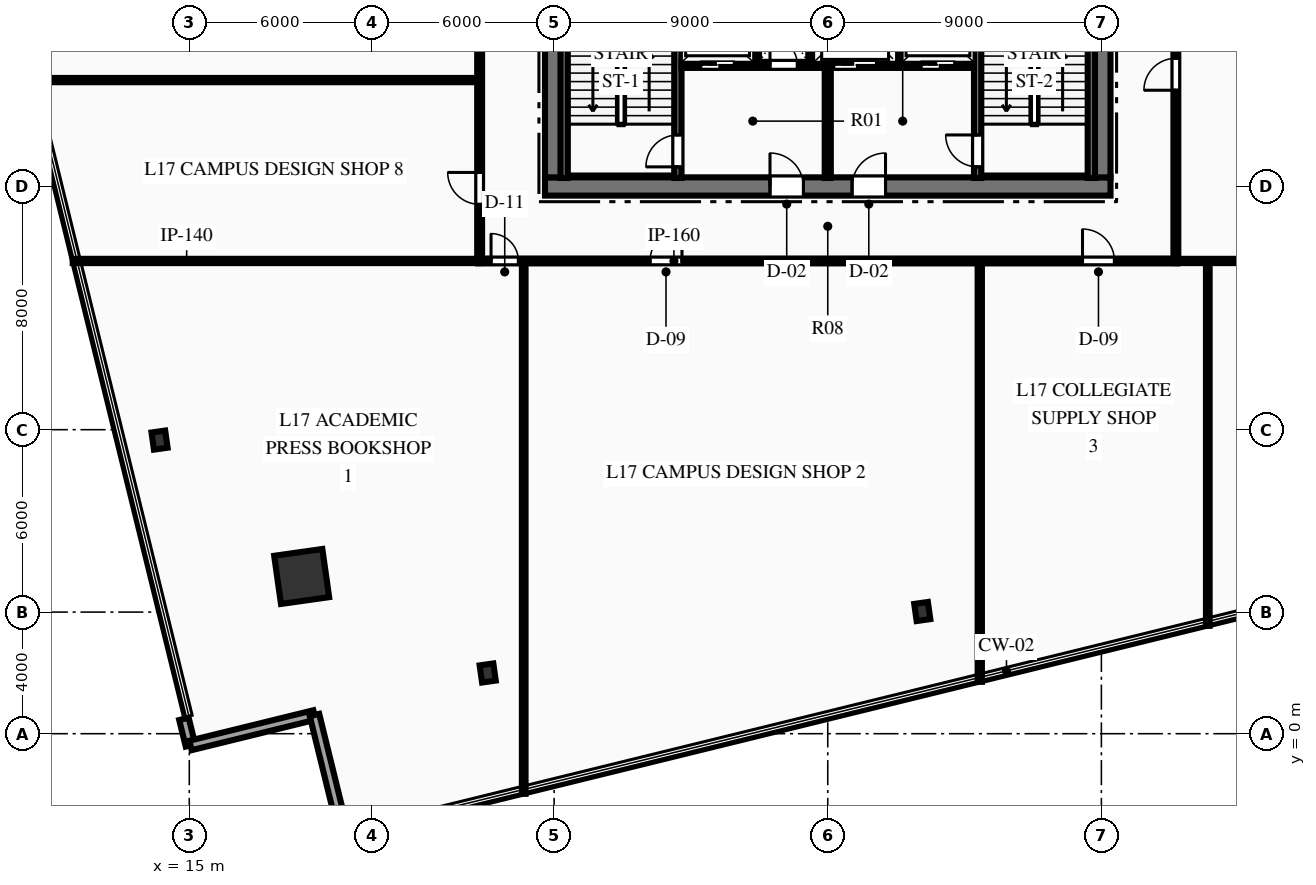
"""IFC4 building model, lengths in metres.
Left out: names, types, materials, properties, quantities, classifications, styles, units other than length and angle.
Written with IfcOpenShell. Run it as: python <this file> out.ifc"""

import sys

from ifc_helpers import new_model, si_unit, direction, frame, frame_2d, origin, origin_2d, place, context, subcontext, project, spatial, rectangle, hollow_rectangle, i_section, extrude, element, fill, save


model = new_model("IFC4")
c1 = context("Model", 3, precision=1e-05, world=origin(), true_north=direction((0.0, 1.0)))
c2 = subcontext(c1, "Body", "Model", "MODEL_VIEW")
j1 = project(units=[si_unit("LENGTHUNIT", "METRE"), si_unit("PLANEANGLEUNIT", "RADIAN")], contexts=[c1])
p1 = place(None, origin())
s1 = spatial("IfcSite", under=j1, at=p1, CompositionType="ELEMENT")
p2 = place(p1, origin())
s2 = spatial("IfcBuilding", under=s1, at=p2, CompositionType="ELEMENT")
p3 = place(p2, frame((0.0, 0.0, 73.95)))
s3 = spatial("IfcBuildingStorey", under=s2, at=p3, CompositionType="ELEMENT", Elevation=73.95)
p4 = place(p3, frame((26.7, 18.0, 0.0), z_axis=(0.0, 0.0, 1.0), x_axis=(1.0, 0.0, 0.0)))
e1 = element("IfcWall", 1, at=p4, inside=s3, PredefinedType="SHEAR", context=c2, shape_type="SweptSolid", body=[
    extrude(rectangle(XDim=18.6, YDim=0.6, at=frame_2d((9.3, 0.0))), origin(), (0.0, 0.0, 1.0), 3.75),
])
p5 = place(p4, frame((7.4, 0.0, 0.0)))
e2 = element("IfcOpeningElement", 2, at=p5, cuts=e1, PredefinedType="OPENING", context=c2, shape_type="SweptSolid", body=[
    extrude(rectangle(XDim=1.1, YDim=2.15, at=frame_2d((0.55, 1.075))), frame((0.0, 0.31, 0.0), z_axis=(0.0, -1.0, 0.0), x_axis=(1.0, 0.0, 0.0)), (0.0, 0.0, 1.0), 0.62),
])
p6 = place(p4, frame((10.1, 0.0, 0.0)))
e3 = element("IfcOpeningElement", 3, at=p6, cuts=e1, PredefinedType="OPENING", context=c2, shape_type="SweptSolid", body=[
    extrude(rectangle(XDim=1.1, YDim=2.15, at=frame_2d((0.55, 1.075))), frame((0.0, 0.31, 0.0), z_axis=(0.0, -1.0, 0.0), x_axis=(1.0, 0.0, 0.0)), (0.0, 0.0, 1.0), 0.62),
])
p7 = place(p3, frame((27.0, 18.3, 0.0), z_axis=(0.0, 0.0, 1.0), x_axis=(0.0, 1.0, 0.0)))
e4 = element("IfcWall", 4, at=p7, inside=s3, PredefinedType="SHEAR", context=c2, shape_type="SweptSolid", body=[
    extrude(rectangle(XDim=15.4, YDim=0.6, at=frame_2d((7.7, 0.0))), origin(), (0.0, 0.0, 1.0), 3.75),
])
p8 = place(p7, frame((9.94, 0.0, 0.0)))
e5 = element("IfcOpeningElement", 5, at=p8, cuts=e4, PredefinedType="OPENING", context=c2, shape_type="SweptSolid", body=[
    extrude(rectangle(XDim=1.4, YDim=2.2, at=frame_2d((0.7, 1.1))), frame((0.0, 0.31, 0.0), z_axis=(0.0, -1.0, 0.0), x_axis=(1.0, 0.0, 0.0)), (0.0, 0.0, 1.0), 0.62),
])
p9 = place(p3, frame((45.0, 18.3, 0.0), z_axis=(0.0, 0.0, 1.0), x_axis=(0.0, 1.0, 0.0)))
e6 = element("IfcWall", 6, at=p9, inside=s3, PredefinedType="SHEAR", context=c2, shape_type="SweptSolid", body=[
    extrude(rectangle(XDim=15.4, YDim=0.6, at=frame_2d((7.7, 0.0))), origin(), (0.0, 0.0, 1.0), 3.75),
])
p10 = place(p9, frame((9.94, 0.0, 0.0)))
e7 = element("IfcOpeningElement", 7, at=p10, cuts=e6, PredefinedType="OPENING", context=c2, shape_type="SweptSolid", body=[
    extrude(rectangle(XDim=1.4, YDim=2.2, at=frame_2d((0.7, 1.1))), frame((0.0, 0.31, 0.0), z_axis=(0.0, -1.0, 0.0), x_axis=(1.0, 0.0, 0.0)), (0.0, 0.0, 1.0), 0.62),
])
p11 = place(p3, frame((31.07, 18.28, 0.0), z_axis=(0.0, 0.0, 1.0), x_axis=(0.0, 1.0, 0.0)))
e8 = element("IfcWall", 8, at=p11, inside=s3, PredefinedType="SHEAR", context=c2, shape_type="SweptSolid", body=[
    extrude(rectangle(XDim=8.26, YDim=0.24, at=frame_2d((4.13, 0.0))), origin(), (0.0, 0.0, 1.0), 3.75),
])
p12 = place(p11, frame((0.365, 0.0, 0.0)))
e9 = element("IfcOpeningElement", 9, at=p12, cuts=e8, PredefinedType="OPENING", context=c2, shape_type="SweptSolid", body=[
    extrude(rectangle(XDim=1.05, YDim=2.15, at=frame_2d((0.525, 1.075))), frame((0.0, 0.13, 0.0), z_axis=(0.0, -1.0, 0.0), x_axis=(1.0, 0.0, 0.0)), (0.0, 0.0, 1.0), 0.26),
])
p13 = place(p3, frame((27.33, 18.28, 0.0), z_axis=(0.0, 0.0, 1.0), x_axis=(0.0, 1.0, 0.0)))
e10 = element("IfcWall", 10, at=p13, inside=s3, PredefinedType="SHEAR", context=c2, shape_type="SweptSolid", body=[
    extrude(rectangle(XDim=8.26, YDim=0.24, at=frame_2d((4.13, 0.0))), origin(), (0.0, 0.0, 1.0), 3.75),
])
p14 = place(p3, frame((40.93, 18.28, 0.0), z_axis=(0.0, 0.0, 1.0), x_axis=(0.0, 1.0, 0.0)))
e11 = element("IfcWall", 11, at=p14, inside=s3, PredefinedType="SHEAR", context=c2, shape_type="SweptSolid", body=[
    extrude(rectangle(XDim=8.26, YDim=0.24, at=frame_2d((4.13, 0.0))), origin(), (0.0, 0.0, 1.0), 3.75),
])
p15 = place(p14, frame((0.365, 0.0, 0.0)))
e12 = element("IfcOpeningElement", 12, at=p15, cuts=e11, PredefinedType="OPENING", context=c2, shape_type="SweptSolid", body=[
    extrude(rectangle(XDim=1.05, YDim=2.15, at=frame_2d((0.525, 1.075))), frame((0.0, 0.13, 0.0), z_axis=(0.0, -1.0, 0.0), x_axis=(1.0, 0.0, 0.0)), (0.0, 0.0, 1.0), 0.26),
])
p16 = place(p3, frame((44.67, 18.28, 0.0), z_axis=(0.0, 0.0, 1.0), x_axis=(0.0, 1.0, 0.0)))
e13 = element("IfcWall", 13, at=p16, inside=s3, PredefinedType="SHEAR", context=c2, shape_type="SweptSolid", body=[
    extrude(rectangle(XDim=8.26, YDim=0.24, at=frame_2d((4.13, 0.0))), origin(), (0.0, 0.0, 1.0), 3.75),
])
p17 = place(p3, frame((18.696, 5.172, 0.0), z_axis=(0.0, 0.0, 1.0), x_axis=(0.990146240249, 0.140037219771, 0.0)))
e14 = element("IfcColumn", 14, at=p17, inside=s3, PredefinedType="COLUMN", context=c2, shape_type="SweptSolid", body=[
    extrude(hollow_rectangle(XDim=1.6, YDim=1.6, WallThickness=0.08, at=origin_2d()), origin(), (0.0, 0.0, 1.0), 3.75),
])
for number, where, z_axis, x_axis in (
    (15, (24.815, 1.997, 0.0), (0.0, 0.0, 1.0), (0.99, 0.14, 0.0)),
    (16, (39.109, 4.019, 0.0), (0.0, 0.0, 1.0), (0.99, 0.14, 0.0)),
    (17, (14.022, 9.657, 0.0), (0.0, 0.0, 1.0), (0.99, 0.14, 0.0)),
):
    element("IfcColumn", number, at=place(p3, frame(where, z_axis=z_axis, x_axis=x_axis)), inside=s3, PredefinedType="COLUMN", context=c2, shape_type="SweptSolid", body=[
        extrude(i_section(OverallWidth=0.454, OverallDepth=0.569, WebThickness=0.078, FlangeThickness=0.125, at=origin_2d()), origin(), (0.0, 0.0, 1.0), 3.75),
    ])
p18 = place(p3, frame((15.039, -0.387, 0.0), z_axis=(0.0, 0.0, 1.0), x_axis=(-0.238704255463, 0.971092311999, 0.0)))
e18 = element("IfcWall", 18, at=p18, inside=s3, PredefinedType="STANDARD", context=c2, shape_type="SweptSolid", body=[
    extrude(rectangle(XDim=0.9, YDim=0.32, at=frame_2d((0.45, 0.0))), origin(), (0.0, 0.0, 1.0), 3.44),
])
p19 = place(p3, frame((19.118, 0.615, 0.0), z_axis=(0.0, 0.0, 1.0), x_axis=(-0.971129335226, -0.238553587824, 0.0)))
e19 = element("IfcWall", 19, at=p19, inside=s3, PredefinedType="STANDARD", context=c2, shape_type="SweptSolid", body=[
    extrude(rectangle(XDim=4.2, YDim=0.32, at=frame_2d((2.1, 0.0))), origin(), (0.0, 0.0, 1.0), 3.44),
])
p20 = place(p3, frame((20.12, -3.463, 0.0), z_axis=(0.0, 0.0, 1.0), x_axis=(-0.238512231586, 0.971139493267, 0.0)))
e20 = element("IfcWall", 20, at=p20, inside=s3, PredefinedType="STANDARD", context=c2, shape_type="SweptSolid", body=[
    extrude(rectangle(XDim=4.2, YDim=0.32, at=frame_2d((2.1, 0.0))), origin(), (0.0, 0.0, 1.0), 3.44),
])
p21 = place(p3, frame((36.0, 18.28, 0.0), z_axis=(0.0, 0.0, 1.0), x_axis=(0.0, 1.0, 0.0)))
e21 = element("IfcWall", 21, at=p21, inside=s3, PredefinedType="PARTITIONING", context=c2, shape_type="SweptSolid", body=[
    extrude(rectangle(XDim=3.77, YDim=0.2, at=frame_2d((1.885, 0.0))), origin(), (0.0, 0.0, 1.0), 3.44),
])
p22 = place(p3, frame((31.19, 22.0, 0.0), z_axis=(0.0, 0.0, 1.0), x_axis=(1.0, 0.0, 0.0)))
e22 = element("IfcWall", 22, at=p22, inside=s3, PredefinedType="PARTITIONING", context=c2, shape_type="SweptSolid", body=[
    extrude(rectangle(XDim=4.69, YDim=0.2, at=frame_2d((2.345, 0.0))), origin(), (0.0, 0.0, 1.0), 3.44),
])
p23 = place(p22, frame((2.91, 0.0, 0.0)))
e23 = element("IfcOpeningElement", 23, at=p23, cuts=e22, PredefinedType="OPENING", context=c2, shape_type="SweptSolid", body=[
    extrude(rectangle(XDim=0.9, YDim=2.15, at=frame_2d((0.45, 1.075))), frame((0.0, 0.11, 0.0), z_axis=(0.0, -1.0, 0.0), x_axis=(1.0, 0.0, 0.0)), (0.0, 0.0, 1.0), 0.22),
])
p24 = place(p22, frame((0.635, 0.0, 0.0)))
e24 = element("IfcOpeningElement", 24, at=p24, cuts=e22, PredefinedType="OPENING", context=c2, shape_type="SweptSolid", body=[
    extrude(rectangle(XDim=1.1, YDim=2.15, at=frame_2d((0.55, 1.075))), frame((0.0, 0.11, 0.0), z_axis=(0.0, -1.0, 0.0), x_axis=(1.0, 0.0, 0.0)), (0.0, 0.0, 1.0), 0.22),
])
p25 = place(p3, frame((36.12, 22.0, 0.0), z_axis=(0.0, 0.0, 1.0), x_axis=(1.0, 0.0, 0.0)))
e25 = element("IfcWall", 25, at=p25, inside=s3, PredefinedType="PARTITIONING", context=c2, shape_type="SweptSolid", body=[
    extrude(rectangle(XDim=4.69, YDim=0.2, at=frame_2d((2.345, 0.0))), origin(), (0.0, 0.0, 1.0), 3.44),
])
p26 = place(p25, frame((2.955, 0.0, 0.0)))
e26 = element("IfcOpeningElement", 26, at=p26, cuts=e25, PredefinedType="OPENING", context=c2, shape_type="SweptSolid", body=[
    extrude(rectangle(XDim=1.1, YDim=2.15, at=frame_2d((0.55, 1.075))), frame((0.0, 0.11, 0.0), z_axis=(0.0, -1.0, 0.0), x_axis=(1.0, 0.0, 0.0)), (0.0, 0.0, 1.0), 0.22),
])
p27 = place(p25, frame((0.08, 0.0, 0.0)))
e27 = element("IfcOpeningElement", 27, at=p27, cuts=e25, PredefinedType="OPENING", context=c2, shape_type="SweptSolid", body=[
    extrude(rectangle(XDim=1.4, YDim=2.2, at=frame_2d((0.7, 1.1))), frame((0.0, 0.11, 0.0), z_axis=(0.0, -1.0, 0.0), x_axis=(1.0, 0.0, 0.0)), (0.0, 0.0, 1.0), 0.22),
])
for number, where, z_axis, x_axis in (
    (28, (33.65, 22.05, 0.0), (0.0, 0.0, 1.0), (0.0, 1.0, 0.0)),
    (29, (35.45, 22.05, 0.0), (0.0, 0.0, 1.0), (0.0, 1.0, 0.0)),
    (30, (38.35, 22.05, 0.0), (0.0, 0.0, 1.0), (0.0, 1.0, 0.0)),
):
    element("IfcWall", number, at=place(p3, frame(where, z_axis=z_axis, x_axis=x_axis)), inside=s3, PredefinedType="PARTITIONING", context=c2, shape_type="SweptSolid", body=[
        extrude(rectangle(XDim=2.6, YDim=0.18, at=frame_2d((1.3, 0.0))), origin(), (0.0, 0.0, 1.0), 3.44),
    ])
p28 = place(p3, frame((24.5, 15.55, 0.0), z_axis=(0.0, 0.0, 1.0), x_axis=(1.0, 0.0, 0.0)))
e31 = element("IfcWall", 31, at=p28, inside=s3, PredefinedType="PARTITIONING", context=c2, shape_type="SweptSolid", body=[
    extrude(rectangle(XDim=23.0, YDim=0.16, at=frame_2d((11.5, 0.0))), origin(), (0.0, 0.0, 1.0), 3.44),
])
p29 = place(p28, frame((0.425, 0.0, 0.0)))
e32 = element("IfcOpeningElement", 32, at=p29, cuts=e31, PredefinedType="OPENING", context=c2, shape_type="SweptSolid", body=[
    extrude(rectangle(XDim=0.9, YDim=2.15, at=frame_2d((0.45, 1.075))), frame((0.0, 0.09, 0.0), z_axis=(0.0, -1.0, 0.0), x_axis=(1.0, 0.0, 0.0)), (0.0, 0.0, 1.0), 0.18),
])
p30 = place(p28, frame((5.655, 0.0, 0.0)))
e33 = element("IfcOpeningElement", 33, at=p30, cuts=e31, PredefinedType="OPENING", context=c2, shape_type="SweptSolid", body=[
    extrude(rectangle(XDim=1.05, YDim=2.15, at=frame_2d((0.525, 1.075))), frame((0.0, 0.09, 0.0), z_axis=(0.0, -1.0, 0.0), x_axis=(1.0, 0.0, 0.0)), (0.0, 0.0, 1.0), 0.18),
])
p31 = place(p28, frame((19.879, 0.0, 0.0)))
e34 = element("IfcOpeningElement", 34, at=p31, cuts=e31, PredefinedType="OPENING", context=c2, shape_type="SweptSolid", body=[
    extrude(rectangle(XDim=1.05, YDim=2.15, at=frame_2d((0.525, 1.075))), frame((0.0, 0.09, 0.0), z_axis=(0.0, -1.0, 0.0), x_axis=(1.0, 0.0, 0.0)), (0.0, 0.0, 1.0), 0.18),
])
p32 = place(p3, frame((24.55, 15.55, 0.0), z_axis=(0.0, 0.0, 1.0), x_axis=(0.0, 1.0, 0.0)))
e35 = element("IfcWall", 35, at=p32, inside=s3, PredefinedType="PARTITIONING", context=c2, shape_type="SweptSolid", body=[
    extrude(rectangle(XDim=20.9, YDim=0.16, at=frame_2d((10.45, 0.0))), origin(), (0.0, 0.0, 1.0), 3.44),
])
p33 = place(p32, frame((1.862, 0.0, 0.0)))
e36 = element("IfcOpeningElement", 36, at=p33, cuts=e35, PredefinedType="OPENING", context=c2, shape_type="SweptSolid", body=[
    extrude(rectangle(XDim=1.05, YDim=2.15, at=frame_2d((0.525, 1.075))), frame((0.0, 0.09, 0.0), z_axis=(0.0, -1.0, 0.0), x_axis=(1.0, 0.0, 0.0)), (0.0, 0.0, 1.0), 0.18),
])
p34 = place(p32, frame((10.509, 0.0, 0.0)))
e37 = element("IfcOpeningElement", 37, at=p34, cuts=e35, PredefinedType="OPENING", context=c2, shape_type="SweptSolid", body=[
    extrude(rectangle(XDim=1.05, YDim=2.15, at=frame_2d((0.525, 1.075))), frame((0.0, 0.09, 0.0), z_axis=(0.0, -1.0, 0.0), x_axis=(1.0, 0.0, 0.0)), (0.0, 0.0, 1.0), 0.18),
])
p35 = place(p32, frame((15.426, 0.0, 0.0)))
e38 = element("IfcOpeningElement", 38, at=p35, cuts=e35, PredefinedType="OPENING", context=c2, shape_type="SweptSolid", body=[
    extrude(rectangle(XDim=1.05, YDim=2.15, at=frame_2d((0.525, 1.075))), frame((0.0, 0.09, 0.0), z_axis=(0.0, -1.0, 0.0), x_axis=(1.0, 0.0, 0.0)), (0.0, 0.0, 1.0), 0.18),
])
p36 = place(p3, frame((47.45, 15.55, 0.0), z_axis=(0.0, 0.0, 1.0), x_axis=(0.0, 1.0, 0.0)))
e39 = element("IfcWall", 39, at=p36, inside=s3, PredefinedType="PARTITIONING", context=c2, shape_type="SweptSolid", body=[
    extrude(rectangle(XDim=20.9, YDim=0.16, at=frame_2d((10.45, 0.0))), origin(), (0.0, 0.0, 1.0), 3.44),
])
p37 = place(p36, frame((5.616, 0.0, 0.0)))
e40 = element("IfcOpeningElement", 40, at=p37, cuts=e39, PredefinedType="OPENING", context=c2, shape_type="SweptSolid", body=[
    extrude(rectangle(XDim=1.05, YDim=2.15, at=frame_2d((0.525, 1.075))), frame((0.0, 0.09, 0.0), z_axis=(0.0, -1.0, 0.0), x_axis=(1.0, 0.0, 0.0)), (0.0, 0.0, 1.0), 0.18),
])
p38 = place(p36, frame((17.405, 0.0, 0.0)))
e41 = element("IfcOpeningElement", 41, at=p38, cuts=e39, PredefinedType="OPENING", context=c2, shape_type="SweptSolid", body=[
    extrude(rectangle(XDim=1.05, YDim=2.15, at=frame_2d((0.525, 1.075))), frame((0.0, 0.09, 0.0), z_axis=(0.0, -1.0, 0.0), x_axis=(1.0, 0.0, 0.0)), (0.0, 0.0, 1.0), 0.18),
])
p39 = place(p3, frame((11.166, 15.55, 0.0), z_axis=(0.0, 0.0, 1.0), x_axis=(1.0, 0.0, 0.0)))
e42 = element("IfcWall", 42, at=p39, inside=s3, PredefinedType="PARTITIONING", context=c2, shape_type="SweptSolid", body=[
    extrude(rectangle(XDim=13.384, YDim=0.14, at=frame_2d((6.692, 0.0))), origin(), (0.0, 0.0, 1.0), 3.44),
])
p40 = place(p3, frame((47.45, 15.55, 0.0), z_axis=(0.0, 0.0, 1.0), x_axis=(1.0, 0.0, 0.0)))
e43 = element("IfcWall", 43, at=p40, inside=s3, PredefinedType="PARTITIONING", context=c2, shape_type="SweptSolid", body=[
    extrude(rectangle(XDim=18.518, YDim=0.14, at=frame_2d((9.259, 0.0))), origin(), (0.0, 0.0, 1.0), 3.44),
])
p41 = place(p40, frame((5.54, 0.0, 0.0)))
e44 = element("IfcOpeningElement", 44, at=p41, cuts=e43, PredefinedType="OPENING", context=c2, shape_type="SweptSolid", body=[
    extrude(rectangle(XDim=0.95, YDim=2.15, at=frame_2d((0.475, 1.075))), frame((0.0, 0.08, 0.0), z_axis=(0.0, -1.0, 0.0), x_axis=(1.0, 0.0, 0.0)), (0.0, 0.0, 1.0), 0.16),
])
p42 = place(p3, frame((26.0, -1.978, 0.0), z_axis=(0.0, 0.0, 1.0), x_axis=(0.0, 1.0, 0.0)))
e45 = element("IfcWall", 45, at=p42, inside=s3, PredefinedType="PARTITIONING", context=c2, shape_type="SweptSolid", body=[
    extrude(rectangle(XDim=17.528, YDim=0.12, at=frame_2d((8.764, 0.0))), origin(), (0.0, 0.0, 1.0), 2.972),
])
p43 = place(p3, frame((41.0, 1.706, 0.0), z_axis=(0.0, 0.0, 1.0), x_axis=(0.0, 1.0, 0.0)))
e46 = element("IfcWall", 46, at=p43, inside=s3, PredefinedType="PARTITIONING", context=c2, shape_type="SweptSolid", body=[
    extrude(rectangle(XDim=13.844, YDim=0.14, at=frame_2d((6.922, 0.0))), origin(), (0.0, 0.0, 1.0), 3.44),
])
p44 = place(p3, frame((48.5, 3.549, 0.0), z_axis=(0.0, 0.0, 1.0), x_axis=(0.0, 1.0, 0.0)))
e47 = element("IfcWall", 47, at=p44, inside=s3, PredefinedType="PARTITIONING", context=c2, shape_type="SweptSolid", body=[
    extrude(rectangle(XDim=12.001, YDim=0.12, at=frame_2d((6.001, 0.0))), origin(), (0.0, 0.0, 1.0), 3.44),
])
p45 = place(p3, frame((9.704, 21.5, 0.0), z_axis=(0.0, 0.0, 1.0), x_axis=(1.0, 0.0, 0.0)))
e48 = element("IfcWall", 48, at=p45, inside=s3, PredefinedType="PARTITIONING", context=c2, shape_type="SweptSolid", body=[
    extrude(rectangle(XDim=14.846, YDim=0.14, at=frame_2d((7.423, 0.0))), origin(), (0.0, 0.0, 1.0), 3.44),
])
p46 = place(p12, origin())
e49 = element("IfcDoor", 49, at=p46, inside=s3, OperationType="SINGLE_SWING_LEFT", PredefinedType="DOOR", context=c2, shape_type="SweptSolid", body=[
    extrude(rectangle(XDim=1.05, YDim=2.15, at=frame_2d((0.525, 1.075))), frame((0.0, 0.025, 0.0), z_axis=(0.0, -1.0, 0.0), x_axis=(1.0, 0.0, 0.0)), (0.0, 0.0, 1.0), 0.05),
])
fill(e9, e49)
p47 = place(p15, origin())
e50 = element("IfcDoor", 50, at=p47, inside=s3, OperationType="SINGLE_SWING_RIGHT", PredefinedType="DOOR", context=c2, shape_type="SweptSolid", body=[
    extrude(rectangle(XDim=1.05, YDim=2.15, at=frame_2d((0.525, 1.075))), frame((0.0, 0.025, 0.0), z_axis=(0.0, -1.0, 0.0), x_axis=(1.0, 0.0, 0.0)), (0.0, 0.0, 1.0), 0.05),
])
fill(e12, e50)
p48 = place(p5, origin())
e51 = element("IfcDoor", 51, at=p48, inside=s3, OperationType="SINGLE_SWING_LEFT", PredefinedType="DOOR", context=c2, shape_type="SweptSolid", body=[
    extrude(rectangle(XDim=1.1, YDim=2.15, at=frame_2d((0.55, 1.075))), frame((0.0, 0.025, 0.0), z_axis=(0.0, -1.0, 0.0), x_axis=(1.0, 0.0, 0.0)), (0.0, 0.0, 1.0), 0.05),
])
fill(e2, e51)
p49 = place(p6, origin())
e52 = element("IfcDoor", 52, at=p49, inside=s3, OperationType="SINGLE_SWING_RIGHT", PredefinedType="DOOR", context=c2, shape_type="SweptSolid", body=[
    extrude(rectangle(XDim=1.1, YDim=2.15, at=frame_2d((0.55, 1.075))), frame((0.0, 0.025, 0.0), z_axis=(0.0, -1.0, 0.0), x_axis=(1.0, 0.0, 0.0)), (0.0, 0.0, 1.0), 0.05),
])
fill(e3, e52)
p50 = place(p23, origin())
e53 = element("IfcDoor", 53, at=p50, inside=s3, OperationType="SINGLE_SWING_LEFT", PredefinedType="DOOR", context=c2, shape_type="SweptSolid", body=[
    extrude(rectangle(XDim=0.9, YDim=2.15, at=frame_2d((0.45, 1.075))), frame((0.0, 0.025, 0.0), z_axis=(0.0, -1.0, 0.0), x_axis=(1.0, 0.0, 0.0)), (0.0, 0.0, 1.0), 0.05),
])
fill(e23, e53)
p51 = place(p29, origin())
e54 = element("IfcDoor", 54, at=p51, inside=s3, OperationType="SINGLE_SWING_LEFT", PredefinedType="DOOR", context=c2, shape_type="SweptSolid", body=[
    extrude(rectangle(XDim=0.9, YDim=2.15, at=frame_2d((0.45, 1.075))), frame((0.0, 0.025, 0.0), z_axis=(0.0, -1.0, 0.0), x_axis=(1.0, 0.0, 0.0)), (0.0, 0.0, 1.0), 0.05),
])
fill(e32, e54)
p52 = place(p30, origin())
e55 = element("IfcDoor", 55, at=p52, inside=s3, OperationType="SINGLE_SWING_RIGHT", PredefinedType="DOOR", context=c2, shape_type="SweptSolid", body=[
    extrude(rectangle(XDim=1.05, YDim=2.15, at=frame_2d((0.525, 1.075))), frame((0.0, 0.025, 0.0), z_axis=(0.0, -1.0, 0.0), x_axis=(1.0, 0.0, 0.0)), (0.0, 0.0, 1.0), 0.05),
])
fill(e33, e55)
p53 = place(p31, origin())
e56 = element("IfcDoor", 56, at=p53, inside=s3, OperationType="SINGLE_SWING_LEFT", PredefinedType="DOOR", context=c2, shape_type="SweptSolid", body=[
    extrude(rectangle(XDim=1.05, YDim=2.15, at=frame_2d((0.525, 1.075))), frame((0.0, 0.025, 0.0), z_axis=(0.0, -1.0, 0.0), x_axis=(1.0, 0.0, 0.0)), (0.0, 0.0, 1.0), 0.05),
])
fill(e34, e56)
p54 = place(p33, origin())
e57 = element("IfcDoor", 57, at=p54, inside=s3, OperationType="SINGLE_SWING_RIGHT", PredefinedType="DOOR", context=c2, shape_type="SweptSolid", body=[
    extrude(rectangle(XDim=1.05, YDim=2.15, at=frame_2d((0.525, 1.075))), frame((0.0, 0.025, 0.0), z_axis=(0.0, -1.0, 0.0), x_axis=(1.0, 0.0, 0.0)), (0.0, 0.0, 1.0), 0.05),
])
fill(e36, e57)
p55 = place(p37, origin())
e58 = element("IfcDoor", 58, at=p55, inside=s3, OperationType="SINGLE_SWING_LEFT", PredefinedType="DOOR", context=c2, shape_type="SweptSolid", body=[
    extrude(rectangle(XDim=1.05, YDim=2.15, at=frame_2d((0.525, 1.075))), frame((0.0, 0.025, 0.0), z_axis=(0.0, -1.0, 0.0), x_axis=(1.0, 0.0, 0.0)), (0.0, 0.0, 1.0), 0.05),
])
fill(e40, e58)
p56 = place(p24, origin())
e59 = element("IfcDoor", 59, at=p56, inside=s3, OperationType="SLIDING_TO_LEFT", PredefinedType="DOOR", context=c2, shape_type="SweptSolid", body=[
    extrude(rectangle(XDim=1.1, YDim=2.15, at=frame_2d((0.55, 1.075))), frame((0.0, 0.025, 0.0), z_axis=(0.0, -1.0, 0.0), x_axis=(1.0, 0.0, 0.0)), (0.0, 0.0, 1.0), 0.05),
])
fill(e24, e59)
p57 = place(p26, origin())
e60 = element("IfcDoor", 60, at=p57, inside=s3, OperationType="SLIDING_TO_LEFT", PredefinedType="DOOR", context=c2, shape_type="SweptSolid", body=[
    extrude(rectangle(XDim=1.1, YDim=2.15, at=frame_2d((0.55, 1.075))), frame((0.0, 0.025, 0.0), z_axis=(0.0, -1.0, 0.0), x_axis=(1.0, 0.0, 0.0)), (0.0, 0.0, 1.0), 0.05),
])
fill(e26, e60)
p58 = place(p27, origin())
e61 = element("IfcDoor", 61, at=p58, inside=s3, OperationType="SLIDING_TO_LEFT", PredefinedType="DOOR", context=c2, shape_type="SweptSolid", body=[
    extrude(rectangle(XDim=1.4, YDim=2.2, at=frame_2d((0.7, 1.1))), frame((0.0, 0.025, 0.0), z_axis=(0.0, -1.0, 0.0), x_axis=(1.0, 0.0, 0.0)), (0.0, 0.0, 1.0), 0.05),
])
fill(e27, e61)
save(model, sys.argv[1])
